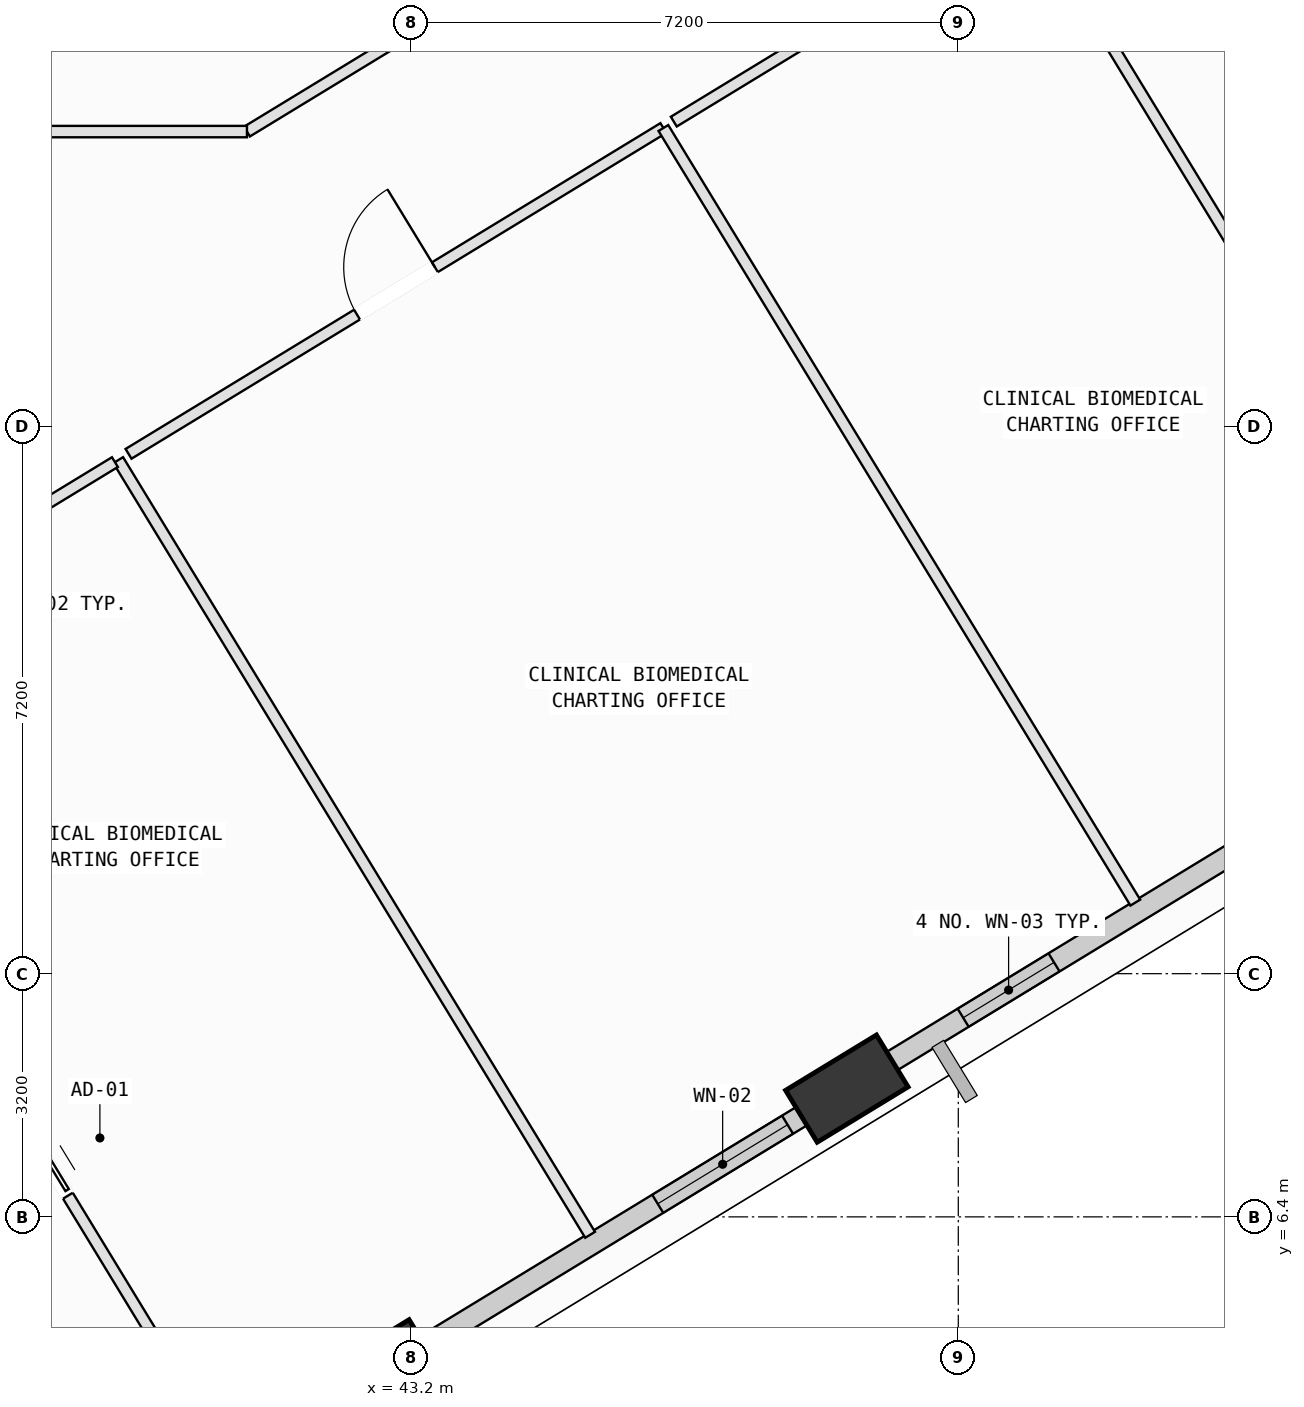
"""IFC4 building model, lengths in metres.
Left out: names, types, materials, properties, quantities, classifications, styles, units other than length and angle.
Written with IfcOpenShell. Run it as: python <this file> out.ifc"""

import sys

from ifc_helpers import new_model, si_unit, direction, frame, frame_2d, origin, origin_2d, place, context, subcontext, project, spatial, rectangle, extrude, element, fill, save


model = new_model("IFC4")
c1 = context("Model", 3, precision=1e-05, world=origin(), true_north=direction((0.0, 1.0)))
c2 = subcontext(c1, "Body", "Model", "MODEL_VIEW")
j1 = project(units=[si_unit("LENGTHUNIT", "METRE"), si_unit("PLANEANGLEUNIT", "RADIAN")], contexts=[c1])
p1 = place(None, origin())
s1 = spatial("IfcSite", under=j1, at=p1, CompositionType="ELEMENT")
p2 = place(p1, origin())
s2 = spatial("IfcBuilding", under=s1, at=p2, CompositionType="ELEMENT")
p3 = place(p2, frame((0.0, 0.0, 157.8)))
s3 = spatial("IfcBuildingStorey", under=s2, at=p3, CompositionType="ELEMENT", Elevation=157.8)
p4 = place(p3, frame((42.785, 4.342, 0.002), z_axis=(0.084126390041, 0.038565532383, 0.995708516691), x_axis=(-0.826791669794, 0.560443862789, 0.048147808071)))
e1 = element("IfcColumn", 1, at=p4, inside=s3, PredefinedType="COLUMN", context=c2, shape_type="SweptSolid", body=[
    extrude(rectangle(XDim=1.4, YDim=0.8, at=origin_2d()), origin(), (0.0, 0.0, 1.0), 4.014),
])
p5 = place(p3, frame((48.934, 8.088, 0.002), z_axis=(0.06842576, 0.063864042666, 0.995610013722), x_axis=(-0.961375750073, 0.270897328505, 0.048696042758)))
e2 = element("IfcColumn", 2, at=p5, inside=s3, PredefinedType="COLUMN", context=c2, shape_type="SweptSolid", body=[
    extrude(rectangle(XDim=1.4, YDim=0.8, at=origin_2d()), origin(), (0.0, 0.0, 1.0), 4.014),
])
p6 = place(p3, frame((48.668, 7.926, 0.0), z_axis=(0.0, 0.0, 1.0), x_axis=(-0.85401095284, -0.520255026338, 0.0)))
e3 = element("IfcWall", 3, at=p6, inside=s3, PredefinedType="SOLIDWALL", context=c2, shape_type="SweptSolid", body=[
    extrude(rectangle(XDim=6.209, YDim=0.28, at=frame_2d((3.104, 0.0))), origin(), (0.0, 0.0, 1.0), 3.165),
])
p7 = place(p6, frame((0.603, 0.0, 0.75)))
e4 = element("IfcOpeningElement", 4, at=p7, cuts=e3, PredefinedType="OPENING", context=c2, shape_type="SweptSolid", body=[
    extrude(rectangle(XDim=2.0, YDim=1.95, at=frame_2d((1.0, 0.975))), frame((0.0, 0.15, 0.0), z_axis=(0.0, -1.0, 0.0), x_axis=(1.0, 0.0, 0.0)), (0.0, 0.0, 1.0), 0.3),
])
p8 = place(p3, frame((54.824, 11.676, 0.0), z_axis=(0.0, 0.0, 1.0), x_axis=(-0.854030198101, -0.52022343347, 0.0)))
e5 = element("IfcWall", 5, at=p8, inside=s3, PredefinedType="SOLIDWALL", context=c2, shape_type="SweptSolid", body=[
    extrude(rectangle(XDim=6.218, YDim=0.28, at=frame_2d((3.109, 0.0))), origin(), (0.0, 0.0, 1.0), 3.165),
])
p9 = place(p8, frame((3.705, 0.0, 0.75)))
e6 = element("IfcOpeningElement", 6, at=p9, cuts=e5, PredefinedType="OPENING", context=c2, shape_type="SweptSolid", body=[
    extrude(rectangle(XDim=1.4, YDim=1.85, at=frame_2d((0.7, 0.925))), frame((0.0, 0.15, 0.0), z_axis=(0.0, -1.0, 0.0), x_axis=(1.0, 0.0, 0.0)), (0.0, 0.0, 1.0), 0.3),
])
p10 = place(p3, frame((36.15, 10.84, 0.0), z_axis=(0.0, 0.0, 1.0), x_axis=(0.52024150956, -0.854019186981, 0.0)))
e7 = element("IfcWall", 7, at=p10, inside=s3, PredefinedType="PARTITIONING", context=c2, shape_type="SweptSolid", body=[
    extrude(rectangle(XDim=8.886, YDim=0.15, at=frame_2d((4.443, 0.0))), origin(), (0.0, 0.0, 1.0), 3.78),
])
p11 = place(p10, frame((4.013, 0.0, 0.0)))
e8 = element("IfcOpeningElement", 8, at=p11, cuts=e7, PredefinedType="OPENING", context=c2, shape_type="SweptSolid", body=[
    extrude(rectangle(XDim=0.86, YDim=2.06, at=frame_2d((0.43, 1.03))), frame((0.0, 0.085, 0.0), z_axis=(0.0, -1.0, 0.0), x_axis=(1.0, 0.0, 0.0)), (0.0, 0.0, 1.0), 0.17),
])
p12 = place(p3, frame((39.347, 16.357, 0.0), z_axis=(0.0, 0.0, 1.0), x_axis=(0.520229856241, -0.854026285705, 0.0)))
e9 = element("IfcWall", 9, at=p12, inside=s3, PredefinedType="PARTITIONING", context=c2, shape_type="SweptSolid", body=[
    extrude(rectangle(XDim=11.935, YDim=0.15, at=frame_2d((5.968, 0.0))), origin(), (0.0, 0.0, 1.0), 3.78),
])
p13 = place(p3, frame((36.193, 14.436, 0.0), z_axis=(0.0, 0.0, 1.0), x_axis=(0.854019897794, 0.520240342699, 0.0)))
e10 = element("IfcWall", 10, at=p13, inside=s3, PredefinedType="PARTITIONING", context=c2, shape_type="SweptSolid", body=[
    extrude(rectangle(XDim=3.643, YDim=0.15, at=frame_2d((1.821, 0.0))), origin(), (0.0, 0.0, 1.0), 3.78),
])
p14 = place(p13, frame((1.221, 0.0, 0.0)))
e11 = element("IfcOpeningElement", 11, at=p14, cuts=e10, PredefinedType="OPENING", context=c2, shape_type="SweptSolid", body=[
    extrude(rectangle(XDim=1.2, YDim=2.15, at=frame_2d((0.6, 1.075))), frame((0.0, 0.085, 0.0), z_axis=(0.0, -1.0, 0.0), x_axis=(1.0, 0.0, 0.0)), (0.0, 0.0, 1.0), 0.17),
])
p15 = place(p3, frame((39.483, 16.44, 0.0), z_axis=(0.0, 0.0, 1.0), x_axis=(0.854001681797, 0.520270244669, 0.0)))
e12 = element("IfcWall", 12, at=p15, inside=s3, PredefinedType="PARTITIONING", context=c2, shape_type="SweptSolid", body=[
    extrude(rectangle(XDim=8.24, YDim=0.15, at=frame_2d((4.12, 0.0))), origin(), (0.0, 0.0, 1.0), 3.78),
])
p16 = place(p15, frame((3.52, 0.0, 0.0)))
e13 = element("IfcOpeningElement", 13, at=p16, cuts=e12, PredefinedType="OPENING", context=c2, shape_type="SweptSolid", body=[
    extrude(rectangle(XDim=1.2, YDim=2.15, at=frame_2d((0.6, 1.075))), frame((0.0, 0.085, 0.0), z_axis=(0.0, -1.0, 0.0), x_axis=(1.0, 0.0, 0.0)), (0.0, 0.0, 1.0), 0.17),
])
p17 = place(p3, frame((46.52, 20.727, 0.0), z_axis=(0.0, 0.0, 1.0), x_axis=(0.520257122218, -0.854009676047, 0.0)))
e14 = element("IfcWall", 14, at=p17, inside=s3, PredefinedType="PARTITIONING", context=c2, shape_type="SweptSolid", body=[
    extrude(rectangle(XDim=11.935, YDim=0.15, at=frame_2d((5.967, 0.0))), origin(), (0.0, 0.0, 1.0), 3.415),
])
p18 = place(p3, frame((49.633, 8.244, 0.0), z_axis=(0.0, 0.0, 1.0), x_axis=(-0.853945935518, -0.520361738806, 0.0)))
e15 = element("IfcWall", 15, at=p18, inside=s3, PredefinedType="PARTITIONING", context=c2, shape_type="SweptSolid", body=[
    extrude(rectangle(XDim=0.99, YDim=0.15, at=frame_2d((0.495, 0.0))), origin(), (0.0, 0.0, 1.0), 3.165),
])
p19 = place(p3, frame((46.657, 20.811, 0.0), z_axis=(0.0, 0.0, 1.0), x_axis=(0.85402865448, 0.520225967563, 0.0)))
e16 = element("IfcWall", 16, at=p19, inside=s3, PredefinedType="PARTITIONING", context=c2, shape_type="SweptSolid", body=[
    extrude(rectangle(XDim=5.44, YDim=0.15, at=frame_2d((2.72, 0.0))), origin(), (0.0, 0.0, 1.0), 3.065),
])
p20 = place(p19, frame((2.12, 0.0, 0.0)))
e17 = element("IfcOpeningElement", 17, at=p20, cuts=e16, PredefinedType="OPENING", context=c2, shape_type="SweptSolid", body=[
    extrude(rectangle(XDim=1.2, YDim=2.15, at=frame_2d((0.6, 1.075))), frame((0.0, 0.085, 0.0), z_axis=(0.0, -1.0, 0.0), x_axis=(1.0, 0.0, 0.0)), (0.0, 0.0, 1.0), 0.17),
])
p21 = place(p3, frame((51.303, 23.641, 0.0), z_axis=(0.0, 0.0, 1.0), x_axis=(0.520220768099, -0.854031821678, 0.0)))
e18 = element("IfcWall", 18, at=p21, inside=s3, PredefinedType="PARTITIONING", context=c2, shape_type="SweptSolid", body=[
    extrude(rectangle(XDim=11.935, YDim=0.15, at=frame_2d((5.968, 0.0))), origin(), (0.0, 0.0, 1.0), 3.78),
])
p22 = place(p3, frame((45.998, 23.699, 0.0), z_axis=(0.0, 0.0, 1.0), x_axis=(-0.854066940543, -0.520163110065, 0.0)))
e19 = element("IfcWall", 19, at=p22, inside=s3, PredefinedType="PARTITIONING", context=c2, shape_type="SweptSolid", body=[
    extrude(rectangle(XDim=5.804, YDim=0.15, at=frame_2d((2.902, 0.0))), origin(), (0.0, 0.0, 1.0), 3.78),
])
p23 = place(p3, frame((41.041, 20.68, 0.0), z_axis=(0.0, 0.0, 1.0), x_axis=(-1.0, 0.0, 0.0)))
e20 = element("IfcWall", 20, at=p23, inside=s3, PredefinedType="PARTITIONING", context=c2, shape_type="SweptSolid", body=[
    extrude(rectangle(XDim=6.5, YDim=0.15, at=frame_2d((3.25, 0.0))), origin(), (0.0, 0.0, 1.0), 3.415),
])
p24 = place(p23, frame((2.65, 0.0, 0.0)))
e21 = element("IfcOpeningElement", 21, at=p24, cuts=e20, PredefinedType="OPENING", context=c2, shape_type="SweptSolid", body=[
    extrude(rectangle(XDim=1.2, YDim=2.15, at=frame_2d((0.6, 1.075))), frame((0.0, 0.085, 0.0), z_axis=(0.0, -1.0, 0.0), x_axis=(1.0, 0.0, 0.0)), (0.0, 0.0, 1.0), 0.17),
])
p25 = place(p7, origin())
e22 = element("IfcWindow", 22, at=p25, inside=s3, PartitioningType="SINGLE_PANEL", PredefinedType="WINDOW", context=c2, shape_type="SweptSolid", body=[
    extrude(rectangle(XDim=2.0, YDim=1.95, at=frame_2d((1.0, 0.975))), frame((0.0, 0.03, 0.0), z_axis=(0.0, -1.0, 0.0), x_axis=(1.0, 0.0, 0.0)), (0.0, 0.0, 1.0), 0.06),
])
fill(e4, e22)
p26 = place(p9, origin())
e23 = element("IfcWindow", 23, at=p26, inside=s3, PartitioningType="SINGLE_PANEL", PredefinedType="WINDOW", context=c2, shape_type="SweptSolid", body=[
    extrude(rectangle(XDim=1.4, YDim=1.85, at=frame_2d((0.7, 0.925))), frame((0.0, 0.03, 0.0), z_axis=(0.0, -1.0, 0.0), x_axis=(1.0, 0.0, 0.0)), (0.0, 0.0, 1.0), 0.06),
])
fill(e6, e23)
p27 = place(p16, origin())
e24 = element("IfcDoor", 24, at=p27, inside=s3, OperationType="SINGLE_SWING_RIGHT", PredefinedType="DOOR", context=c2, shape_type="SweptSolid", body=[
    extrude(rectangle(XDim=1.2, YDim=2.15, at=frame_2d((0.6, 1.075))), frame((0.0, 0.025, 0.0), z_axis=(0.0, -1.0, 0.0), x_axis=(1.0, 0.0, 0.0)), (0.0, 0.0, 1.0), 0.05),
])
fill(e13, e24)
p28 = place(p11, origin())
e25 = element("IfcDoor", 25, at=p28, inside=s3, OperationType="SLIDING_TO_LEFT", PredefinedType="DOOR", context=c2, shape_type="SweptSolid", body=[
    extrude(rectangle(XDim=0.86, YDim=2.06, at=frame_2d((0.43, 1.03))), frame((0.0, 0.025, 0.0), z_axis=(0.0, -1.0, 0.0), x_axis=(1.0, 0.0, 0.0)), (0.0, 0.0, 1.0), 0.05),
])
fill(e8, e25)
save(model, sys.argv[1])
